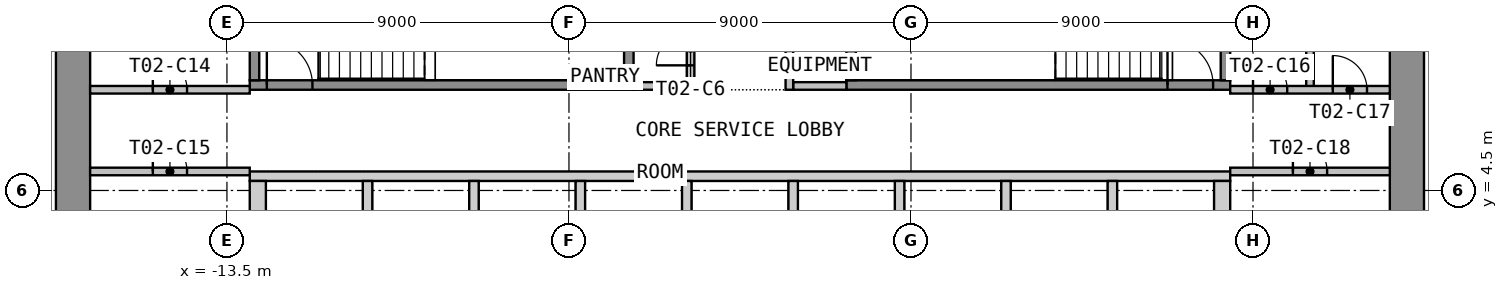
"""IFC4 building model, lengths in metres.
Left out: names, types, materials, properties, quantities, classifications, styles, units other than length and angle.
Written with IfcOpenShell. Run it as: python <this file> out.ifc"""

import sys

from ifc_helpers import new_model, si_unit, direction, frame, frame_2d, origin, place, context, subcontext, project, spatial, polyline, rectangle, outline, extrude, element, fill, save


model = new_model("IFC4")
c1 = context("Model", 3, precision=1e-05, world=origin(), true_north=direction((0.0, 1.0)))
c2 = subcontext(c1, "Body", "Model", "MODEL_VIEW")
j1 = project(units=[si_unit("LENGTHUNIT", "METRE"), si_unit("PLANEANGLEUNIT", "RADIAN")], contexts=[c1])
p1 = place(None, origin())
s1 = spatial("IfcSite", under=j1, at=p1, CompositionType="ELEMENT")
p2 = place(p1, origin())
s2 = spatial("IfcBuilding", under=s1, at=p2, CompositionType="ELEMENT")
p3 = place(p2, frame((0.0, 0.0, 41.7)))
s3 = spatial("IfcBuildingStorey", under=s2, at=p3, CompositionType="ELEMENT", Elevation=41.7)
p4 = place(p3, frame((-17.55, -12.6, 0.0), z_axis=(0.0, 0.0, 1.0), x_axis=(0.0, 1.0, 0.0)))
e1 = element("IfcWall", 1, at=p4, inside=s3, PredefinedType="SHEAR", context=c2, shape_type="SweptSolid", body=[
    extrude(rectangle(XDim=25.2, YDim=0.9, at=frame_2d((12.6, 0.0))), origin(), (0.0, 0.0, 1.0), 3.525),
])
p5 = place(p4, frame((11.4, 0.0, 0.0)))
e2 = element("IfcOpeningElement", 2, at=p5, cuts=e1, PredefinedType="OPENING", context=c2, shape_type="SweptSolid", body=[
    extrude(rectangle(XDim=2.4, YDim=2.1, at=frame_2d((1.2, 1.05))), frame((0.0, 0.46, 0.0), z_axis=(0.0, -1.0, 0.0), x_axis=(1.0, 0.0, 0.0)), (0.0, 0.0, 1.0), 0.92),
])
p6 = place(p3, frame((17.55, -12.6, 0.0), z_axis=(0.0, 0.0, 1.0), x_axis=(0.0, 1.0, 0.0)))
e3 = element("IfcWall", 3, at=p6, inside=s3, PredefinedType="SHEAR", context=c2, shape_type="SweptSolid", body=[
    extrude(rectangle(XDim=25.2, YDim=0.9, at=frame_2d((12.6, 0.0))), origin(), (0.0, 0.0, 1.0), 3.525),
])
p7 = place(p6, frame((11.4, 0.0, 0.0)))
e4 = element("IfcOpeningElement", 4, at=p7, cuts=e3, PredefinedType="OPENING", context=c2, shape_type="SweptSolid", body=[
    extrude(rectangle(XDim=2.4, YDim=2.1, at=frame_2d((1.2, 1.05))), frame((0.0, 0.46, 0.0), z_axis=(0.0, -1.0, 0.0), x_axis=(1.0, 0.0, 0.0)), (0.0, 0.0, 1.0), 0.92),
])
p8 = place(p3, origin())
e5 = element("IfcWall", 5, at=p8, inside=s3, PredefinedType="SHEAR", context=c2, shape_type="SweptSolid", body=[
    extrude(outline(polyline([(-12.9, 4.75), (12.9, 4.75), (12.9, 5.0), (-12.9, 5.0), (-12.9, 4.75)])), origin(), (0.0, 0.0, 1.0), 3.525),
])
p9 = place(p3, origin())
e6 = element("IfcWall", 6, at=p9, inside=s3, PredefinedType="SHEAR", context=c2, shape_type="SweptSolid", body=[
    extrude(outline(polyline([(-12.9, 2.05), (-12.475, 2.05), (-12.475, 4.75), (-12.9, 4.75), (-12.9, 2.05)])), origin(), (0.0, 0.0, 1.0), 3.525),
])
p10 = place(p3, origin())
e7 = element("IfcWall", 7, at=p10, inside=s3, PredefinedType="SHEAR", context=c2, shape_type="SweptSolid", body=[
    extrude(outline(polyline([(-9.925, 2.05), (-9.675, 2.05), (-9.675, 4.75), (-9.925, 4.75), (-9.925, 2.05)])), origin(), (0.0, 0.0, 1.0), 3.525),
])
p11 = place(p3, origin())
e8 = element("IfcWall", 8, at=p11, inside=s3, PredefinedType="SHEAR", context=c2, shape_type="SweptSolid", body=[
    extrude(outline(polyline([(-7.125, 2.05), (-6.875, 2.05), (-6.875, 4.75), (-7.125, 4.75), (-7.125, 2.05)])), origin(), (0.0, 0.0, 1.0), 3.525),
])
p12 = place(p3, origin())
e9 = element("IfcWall", 9, at=p12, inside=s3, PredefinedType="SHEAR", context=c2, shape_type="SweptSolid", body=[
    extrude(outline(polyline([(-4.325, 2.05), (-4.075, 2.05), (-4.075, 4.75), (-4.325, 4.75), (-4.325, 2.05)])), origin(), (0.0, 0.0, 1.0), 3.525),
])
p13 = place(p3, origin())
e10 = element("IfcWall", 10, at=p13, inside=s3, PredefinedType="SHEAR", context=c2, shape_type="SweptSolid", body=[
    extrude(outline(polyline([(-1.525, 2.05), (-1.275, 2.05), (-1.275, 4.75), (-1.525, 4.75), (-1.525, 2.05)])), origin(), (0.0, 0.0, 1.0), 3.525),
])
p14 = place(p3, origin())
e11 = element("IfcWall", 11, at=p14, inside=s3, PredefinedType="SHEAR", context=c2, shape_type="SweptSolid", body=[
    extrude(outline(polyline([(1.275, 2.05), (1.525, 2.05), (1.525, 4.75), (1.275, 4.75), (1.275, 2.05)])), origin(), (0.0, 0.0, 1.0), 3.525),
])
p15 = place(p3, origin())
e12 = element("IfcWall", 12, at=p15, inside=s3, PredefinedType="SHEAR", context=c2, shape_type="SweptSolid", body=[
    extrude(outline(polyline([(4.075, 2.05), (4.325, 2.05), (4.325, 4.75), (4.075, 4.75), (4.075, 2.05)])), origin(), (0.0, 0.0, 1.0), 3.525),
])
p16 = place(p3, origin())
e13 = element("IfcWall", 13, at=p16, inside=s3, PredefinedType="SHEAR", context=c2, shape_type="SweptSolid", body=[
    extrude(outline(polyline([(6.875, 2.05), (7.125, 2.05), (7.125, 4.75), (6.875, 4.75), (6.875, 2.05)])), origin(), (0.0, 0.0, 1.0), 3.525),
])
p17 = place(p3, origin())
e14 = element("IfcWall", 14, at=p17, inside=s3, PredefinedType="SHEAR", context=c2, shape_type="SweptSolid", body=[
    extrude(outline(polyline([(9.675, 2.05), (9.925, 2.05), (9.925, 4.75), (9.675, 4.75), (9.675, 2.05)])), origin(), (0.0, 0.0, 1.0), 3.525),
])
p18 = place(p3, origin())
e15 = element("IfcWall", 15, at=p18, inside=s3, PredefinedType="SHEAR", context=c2, shape_type="SweptSolid", body=[
    extrude(outline(polyline([(12.475, 2.05), (12.9, 2.05), (12.9, 4.75), (12.475, 4.75), (12.475, 2.05)])), origin(), (0.0, 0.0, 1.0), 3.525),
])
p19 = place(p3, frame((-12.9, 7.275, 0.0), z_axis=(0.0, 0.0, 1.0), x_axis=(1.0, 0.0, 0.0)))
e16 = element("IfcWall", 16, at=p19, inside=s3, PredefinedType="SHEAR", context=c2, shape_type="SweptSolid", body=[
    extrude(rectangle(XDim=10.1, YDim=0.25, at=frame_2d((5.05, 0.0))), origin(), (0.0, 0.0, 1.0), 3.525),
])
p20 = place(p19, frame((0.45, 0.0, 0.0)))
e17 = element("IfcOpeningElement", 17, at=p20, cuts=e16, PredefinedType="OPENING", context=c2, shape_type="SweptSolid", body=[
    extrude(rectangle(XDim=1.2, YDim=2.1, at=frame_2d((0.6, 1.05))), frame((0.0, 0.135, 0.0), z_axis=(0.0, -1.0, 0.0), x_axis=(1.0, 0.0, 0.0)), (0.0, 0.0, 1.0), 0.27),
])
for number, where, z_axis, x_axis in (
    (18, (-12.775, 7.4, 0.0), (0.0, 0.0, 1.0), (0.0, 1.0, 0.0)),
    (19, (-2.925, 7.4, 0.0), (0.0, 0.0, 1.0), (0.0, 1.0, 0.0)),
):
    element("IfcWall", number, at=place(p3, frame(where, z_axis=z_axis, x_axis=x_axis)), inside=s3, PredefinedType="SHEAR", context=c2, shape_type="SweptSolid", body=[
        extrude(rectangle(XDim=3.25, YDim=0.25, at=frame_2d((1.625, 0.0))), origin(), (0.0, 0.0, 1.0), 3.525),
    ])
p21 = place(p3, frame((2.8, 7.275, 0.0), z_axis=(0.0, 0.0, 1.0), x_axis=(1.0, 0.0, 0.0)))
e20 = element("IfcWall", 20, at=p21, inside=s3, PredefinedType="SHEAR", context=c2, shape_type="SweptSolid", body=[
    extrude(rectangle(XDim=10.1, YDim=0.25, at=frame_2d((5.05, 0.0))), origin(), (0.0, 0.0, 1.0), 3.525),
])
p22 = place(p21, frame((8.45, 0.0, 0.0)))
e21 = element("IfcOpeningElement", 21, at=p22, cuts=e20, PredefinedType="OPENING", context=c2, shape_type="SweptSolid", body=[
    extrude(rectangle(XDim=1.2, YDim=2.1, at=frame_2d((0.6, 1.05))), frame((0.0, 0.135, 0.0), z_axis=(0.0, -1.0, 0.0), x_axis=(1.0, 0.0, 0.0)), (0.0, 0.0, 1.0), 0.27),
])
for number, where, z_axis, x_axis in (
    (22, (2.925, 7.4, 0.0), (0.0, 0.0, 1.0), (0.0, 1.0, 0.0)),
    (23, (12.775, 7.4, 0.0), (0.0, 0.0, 1.0), (0.0, 1.0, 0.0)),
):
    element("IfcWall", number, at=place(p3, frame(where, z_axis=z_axis, x_axis=x_axis)), inside=s3, PredefinedType="SHEAR", context=c2, shape_type="SweptSolid", body=[
        extrude(rectangle(XDim=3.25, YDim=0.25, at=frame_2d((1.625, 0.0))), origin(), (0.0, 0.0, 1.0), 3.525),
    ])
for number, where, z_axis, x_axis in (
    (24, (-2.8, 7.25, 0.0), (0.0, 0.0, 1.0), (1.0, 0.0, 0.0)),
    (25, (1.4, 7.25, 0.0), (0.0, 0.0, 1.0), (1.0, 0.0, 0.0)),
):
    element("IfcWall", number, at=place(p3, frame(where, z_axis=z_axis, x_axis=x_axis)), inside=s3, PredefinedType="PARTITIONING", context=c2, shape_type="SweptSolid", body=[
        extrude(rectangle(XDim=1.4, YDim=0.2, at=frame_2d((0.7, 0.0))), origin(), (0.0, 0.0, 1.0), 3.525),
    ])
p23 = place(p3, frame((-1.3, 7.15, 0.0), z_axis=(0.0, 0.0, 1.0), x_axis=(0.0, 1.0, 0.0)))
e26 = element("IfcWall", 26, at=p23, inside=s3, PredefinedType="PARTITIONING", context=c2, shape_type="SweptSolid", body=[
    extrude(rectangle(XDim=5.45, YDim=0.2, at=frame_2d((2.725, 0.0))), origin(), (0.0, 0.0, 1.0), 3.525),
])
p24 = place(p23, frame((0.643, 0.0, 0.0)))
e27 = element("IfcOpeningElement", 27, at=p24, cuts=e26, PredefinedType="OPENING", context=c2, shape_type="SweptSolid", body=[
    extrude(rectangle(XDim=0.9, YDim=2.1, at=frame_2d((0.45, 1.05))), frame((0.0, 0.11, 0.0), z_axis=(0.0, -1.0, 0.0), x_axis=(1.0, 0.0, 0.0)), (0.0, 0.0, 1.0), 0.22),
])
p25 = place(p23, frame((2.401, 0.0, 0.0)))
e28 = element("IfcOpeningElement", 28, at=p25, cuts=e26, PredefinedType="OPENING", context=c2, shape_type="SweptSolid", body=[
    extrude(rectangle(XDim=0.9, YDim=2.1, at=frame_2d((0.45, 1.05))), frame((0.0, 0.11, 0.0), z_axis=(0.0, -1.0, 0.0), x_axis=(1.0, 0.0, 0.0)), (0.0, 0.0, 1.0), 0.22),
])
p26 = place(p23, frame((4.134, 0.0, 0.0)))
e29 = element("IfcOpeningElement", 29, at=p26, cuts=e26, PredefinedType="OPENING", context=c2, shape_type="SweptSolid", body=[
    extrude(rectangle(XDim=0.9, YDim=2.1, at=frame_2d((0.45, 1.05))), frame((0.0, 0.11, 0.0), z_axis=(0.0, -1.0, 0.0), x_axis=(1.0, 0.0, 0.0)), (0.0, 0.0, 1.0), 0.22),
])
p27 = place(p3, frame((1.3, 7.15, 0.0), z_axis=(0.0, 0.0, 1.0), x_axis=(0.0, 1.0, 0.0)))
e30 = element("IfcWall", 30, at=p27, inside=s3, PredefinedType="PARTITIONING", context=c2, shape_type="SweptSolid", body=[
    extrude(rectangle(XDim=5.45, YDim=0.2, at=frame_2d((2.725, 0.0))), origin(), (0.0, 0.0, 1.0), 3.525),
])
p28 = place(p27, frame((2.375, 0.0, 0.0)))
e31 = element("IfcOpeningElement", 31, at=p28, cuts=e30, PredefinedType="OPENING", context=c2, shape_type="SweptSolid", body=[
    extrude(rectangle(XDim=0.9, YDim=2.1, at=frame_2d((0.45, 1.05))), frame((0.0, 0.11, 0.0), z_axis=(0.0, -1.0, 0.0), x_axis=(1.0, 0.0, 0.0)), (0.0, 0.0, 1.0), 0.22),
])
p29 = place(p3, frame((-17.1, 7.15, 0.0), z_axis=(0.0, 0.0, 1.0), x_axis=(1.0, 0.0, 0.0)))
e32 = element("IfcWall", 32, at=p29, inside=s3, PredefinedType="PARTITIONING", context=c2, shape_type="SweptSolid", body=[
    extrude(rectangle(XDim=4.2, YDim=0.2, at=frame_2d((2.1, 0.0))), origin(), (0.0, 0.0, 1.0), 3.525),
])
p30 = place(p29, frame((1.65, 0.0, 0.0)))
e33 = element("IfcOpeningElement", 33, at=p30, cuts=e32, PredefinedType="OPENING", context=c2, shape_type="SweptSolid", body=[
    extrude(rectangle(XDim=0.9, YDim=2.1, at=frame_2d((0.45, 1.05))), frame((0.0, 0.11, 0.0), z_axis=(0.0, -1.0, 0.0), x_axis=(1.0, 0.0, 0.0)), (0.0, 0.0, 1.0), 0.22),
])
p31 = place(p3, frame((-17.1, 5.0, 0.0), z_axis=(0.0, 0.0, 1.0), x_axis=(1.0, 0.0, 0.0)))
e34 = element("IfcWall", 34, at=p31, inside=s3, PredefinedType="PARTITIONING", context=c2, shape_type="SweptSolid", body=[
    extrude(rectangle(XDim=4.2, YDim=0.2, at=frame_2d((2.1, 0.0))), origin(), (0.0, 0.0, 1.0), 3.525),
])
p32 = place(p31, frame((1.65, 0.0, 0.0)))
e35 = element("IfcOpeningElement", 35, at=p32, cuts=e34, PredefinedType="OPENING", context=c2, shape_type="SweptSolid", body=[
    extrude(rectangle(XDim=0.9, YDim=2.1, at=frame_2d((0.45, 1.05))), frame((0.0, 0.11, 0.0), z_axis=(0.0, -1.0, 0.0), x_axis=(1.0, 0.0, 0.0)), (0.0, 0.0, 1.0), 0.22),
])
p33 = place(p3, frame((15.0, 7.15, 0.0), z_axis=(0.0, 0.0, 1.0), x_axis=(0.0, 1.0, 0.0)))
e36 = element("IfcWall", 36, at=p33, inside=s3, PredefinedType="PARTITIONING", context=c2, shape_type="SweptSolid", body=[
    extrude(rectangle(XDim=5.45, YDim=0.2, at=frame_2d((2.725, 0.0))), origin(), (0.0, 0.0, 1.0), 3.525),
])
p34 = place(p3, frame((12.9, 7.15, 0.0), z_axis=(0.0, 0.0, 1.0), x_axis=(1.0, 0.0, 0.0)))
e37 = element("IfcWall", 37, at=p34, inside=s3, PredefinedType="PARTITIONING", context=c2, shape_type="SweptSolid", body=[
    extrude(rectangle(XDim=4.2, YDim=0.2, at=frame_2d((2.1, 0.0))), origin(), (0.0, 0.0, 1.0), 3.525),
])
p35 = place(p34, frame((0.6, 0.0, 0.0)))
e38 = element("IfcOpeningElement", 38, at=p35, cuts=e37, PredefinedType="OPENING", context=c2, shape_type="SweptSolid", body=[
    extrude(rectangle(XDim=0.9, YDim=2.1, at=frame_2d((0.45, 1.05))), frame((0.0, 0.11, 0.0), z_axis=(0.0, -1.0, 0.0), x_axis=(1.0, 0.0, 0.0)), (0.0, 0.0, 1.0), 0.22),
])
p36 = place(p34, frame((2.7, 0.0, 0.0)))
e39 = element("IfcOpeningElement", 39, at=p36, cuts=e37, PredefinedType="OPENING", context=c2, shape_type="SweptSolid", body=[
    extrude(rectangle(XDim=0.9, YDim=2.1, at=frame_2d((0.45, 1.05))), frame((0.0, 0.11, 0.0), z_axis=(0.0, -1.0, 0.0), x_axis=(1.0, 0.0, 0.0)), (0.0, 0.0, 1.0), 0.22),
])
p37 = place(p3, frame((12.9, 5.0, 0.0), z_axis=(0.0, 0.0, 1.0), x_axis=(1.0, 0.0, 0.0)))
e40 = element("IfcWall", 40, at=p37, inside=s3, PredefinedType="PARTITIONING", context=c2, shape_type="SweptSolid", body=[
    extrude(rectangle(XDim=4.2, YDim=0.2, at=frame_2d((2.1, 0.0))), origin(), (0.0, 0.0, 1.0), 3.525),
])
p38 = place(p37, frame((1.65, 0.0, 0.0)))
e41 = element("IfcOpeningElement", 41, at=p38, cuts=e40, PredefinedType="OPENING", context=c2, shape_type="SweptSolid", body=[
    extrude(rectangle(XDim=0.9, YDim=2.1, at=frame_2d((0.45, 1.05))), frame((0.0, 0.11, 0.0), z_axis=(0.0, -1.0, 0.0), x_axis=(1.0, 0.0, 0.0)), (0.0, 0.0, 1.0), 0.22),
])
p39 = place(p20, origin())
e42 = element("IfcDoor", 42, at=p39, inside=s3, OperationType="SINGLE_SWING_LEFT", PredefinedType="DOOR", context=c2, shape_type="SweptSolid", body=[
    extrude(rectangle(XDim=1.2, YDim=2.1, at=frame_2d((0.6, 1.05))), frame((0.0, 0.025, 0.0), z_axis=(0.0, -1.0, 0.0), x_axis=(1.0, 0.0, 0.0)), (0.0, 0.0, 1.0), 0.05),
])
fill(e17, e42)
p40 = place(p22, origin())
e43 = element("IfcDoor", 43, at=p40, inside=s3, OperationType="SINGLE_SWING_LEFT", PredefinedType="DOOR", context=c2, shape_type="SweptSolid", body=[
    extrude(rectangle(XDim=1.2, YDim=2.1, at=frame_2d((0.6, 1.05))), frame((0.0, 0.025, 0.0), z_axis=(0.0, -1.0, 0.0), x_axis=(1.0, 0.0, 0.0)), (0.0, 0.0, 1.0), 0.05),
])
fill(e21, e43)
p41 = place(p24, origin())
e44 = element("IfcDoor", 44, at=p41, inside=s3, OperationType="SINGLE_SWING_LEFT", PredefinedType="DOOR", context=c2, shape_type="SweptSolid", body=[
    extrude(rectangle(XDim=0.9, YDim=2.1, at=frame_2d((0.45, 1.05))), frame((0.0, 0.025, 0.0), z_axis=(0.0, -1.0, 0.0), x_axis=(1.0, 0.0, 0.0)), (0.0, 0.0, 1.0), 0.05),
])
fill(e27, e44)
p42 = place(p30, origin())
e45 = element("IfcDoor", 45, at=p42, inside=s3, OperationType="SINGLE_SWING_LEFT", PredefinedType="DOOR", context=c2, shape_type="SweptSolid", body=[
    extrude(rectangle(XDim=0.9, YDim=2.1, at=frame_2d((0.45, 1.05))), frame((0.0, 0.025, 0.0), z_axis=(0.0, -1.0, 0.0), x_axis=(1.0, 0.0, 0.0)), (0.0, 0.0, 1.0), 0.05),
])
fill(e33, e45)
p43 = place(p32, origin())
e46 = element("IfcDoor", 46, at=p43, inside=s3, OperationType="SINGLE_SWING_LEFT", PredefinedType="DOOR", context=c2, shape_type="SweptSolid", body=[
    extrude(rectangle(XDim=0.9, YDim=2.1, at=frame_2d((0.45, 1.05))), frame((0.0, 0.025, 0.0), z_axis=(0.0, -1.0, 0.0), x_axis=(1.0, 0.0, 0.0)), (0.0, 0.0, 1.0), 0.05),
])
fill(e35, e46)
p44 = place(p35, origin())
e47 = element("IfcDoor", 47, at=p44, inside=s3, OperationType="SINGLE_SWING_LEFT", PredefinedType="DOOR", context=c2, shape_type="SweptSolid", body=[
    extrude(rectangle(XDim=0.9, YDim=2.1, at=frame_2d((0.45, 1.05))), frame((0.0, 0.025, 0.0), z_axis=(0.0, -1.0, 0.0), x_axis=(1.0, 0.0, 0.0)), (0.0, 0.0, 1.0), 0.05),
])
fill(e38, e47)
p45 = place(p36, origin())
e48 = element("IfcDoor", 48, at=p45, inside=s3, OperationType="SINGLE_SWING_LEFT", PredefinedType="DOOR", context=c2, shape_type="SweptSolid", body=[
    extrude(rectangle(XDim=0.9, YDim=2.1, at=frame_2d((0.45, 1.05))), frame((0.0, 0.025, 0.0), z_axis=(0.0, -1.0, 0.0), x_axis=(1.0, 0.0, 0.0)), (0.0, 0.0, 1.0), 0.05),
])
fill(e39, e48)
p46 = place(p38, origin())
e49 = element("IfcDoor", 49, at=p46, inside=s3, OperationType="SINGLE_SWING_LEFT", PredefinedType="DOOR", context=c2, shape_type="SweptSolid", body=[
    extrude(rectangle(XDim=0.9, YDim=2.1, at=frame_2d((0.45, 1.05))), frame((0.0, 0.025, 0.0), z_axis=(0.0, -1.0, 0.0), x_axis=(1.0, 0.0, 0.0)), (0.0, 0.0, 1.0), 0.05),
])
fill(e41, e49)
save(model, sys.argv[1])
